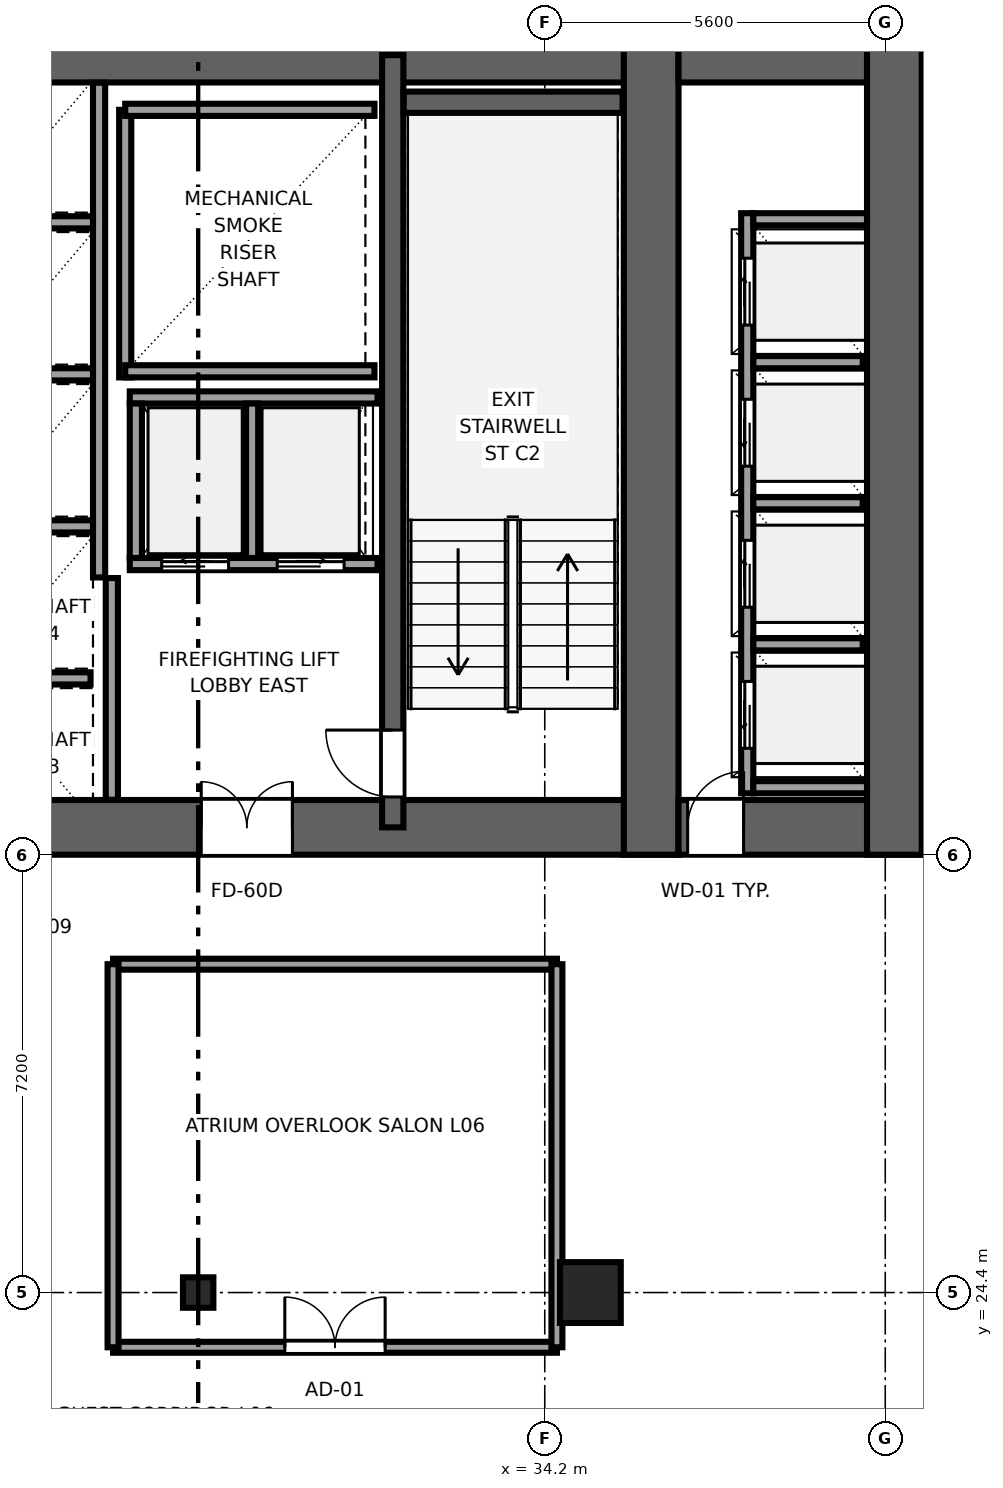
"""IFC4 building model, lengths in metres.
Left out: names, types, materials, properties, quantities, classifications, styles, units other than length and angle.
Written with IfcOpenShell. Run it as: python <this file> out.ifc"""

import sys

from ifc_helpers import new_model, si_unit, direction, frame, frame_2d, origin, origin_2d, place, context, subcontext, project, spatial, rectangle, i_section, extrude, source, transform, mapped, element, fill, save


model = new_model("IFC4")
c1 = context("Model", 3, precision=1e-05, world=origin(), true_north=direction((0.0, 1.0)))
c2 = subcontext(c1, "Body", "Model", "MODEL_VIEW")
j1 = project(units=[si_unit("LENGTHUNIT", "METRE"), si_unit("PLANEANGLEUNIT", "RADIAN")], contexts=[c1])
p1 = place(None, origin())
s1 = spatial("IfcSite", under=j1, at=p1, CompositionType="ELEMENT")
p2 = place(p1, origin())
s2 = spatial("IfcBuilding", under=s1, at=p2, CompositionType="ELEMENT")
p3 = place(p2, frame((0.0, 0.0, 32.0)))
s3 = spatial("IfcBuildingStorey", under=s2, at=p3, CompositionType="ELEMENT", Elevation=32.0)
p4 = place(p3, frame((9.6, 32.05, 0.0), z_axis=(0.0, 0.0, 1.0), x_axis=(1.0, 0.0, 0.0)))
e1 = element("IfcWall", 1, at=p4, inside=s3, PredefinedType="SHEAR", context=c2, shape_type="SweptSolid", body=[
    extrude(rectangle(XDim=26.8, YDim=0.9, at=frame_2d((13.4, 0.0))), origin(), (0.0, 0.0, 1.0), 3.55),
])
p5 = place(p4, frame((7.85, 0.0, 0.0), z_axis=(0.0, 0.0, 1.0), x_axis=(-1.0, 0.0, 0.0)))
e2 = element("IfcOpeningElement", 2, at=p5, cuts=e1, PredefinedType="OPENING", context=c2, shape_type="SweptSolid", body=[
    extrude(rectangle(XDim=1.5, YDim=2.04, at=frame_2d((0.75, 1.02))), frame((0.0, 0.46, 0.0), z_axis=(0.0, -1.0, 0.0), x_axis=(1.0, 0.0, 0.0)), (0.0, 0.0, 1.0), 0.92),
])
p6 = place(p4, frame((14.15, 0.0, 0.0), z_axis=(0.0, 0.0, 1.0), x_axis=(-1.0, 0.0, 0.0)))
e3 = element("IfcOpeningElement", 3, at=p6, cuts=e1, PredefinedType="OPENING", context=c2, shape_type="SweptSolid", body=[
    extrude(rectangle(XDim=1.5, YDim=2.04, at=frame_2d((0.75, 1.02))), frame((0.0, 0.46, 0.0), z_axis=(0.0, -1.0, 0.0), x_axis=(1.0, 0.0, 0.0)), (0.0, 0.0, 1.0), 0.92),
])
p7 = place(p4, frame((20.45, 0.0, 0.0), z_axis=(0.0, 0.0, 1.0), x_axis=(-1.0, 0.0, 0.0)))
e4 = element("IfcOpeningElement", 4, at=p7, cuts=e1, PredefinedType="OPENING", context=c2, shape_type="SweptSolid", body=[
    extrude(rectangle(XDim=1.5, YDim=2.04, at=frame_2d((0.75, 1.02))), frame((0.0, 0.46, 0.0), z_axis=(0.0, -1.0, 0.0), x_axis=(1.0, 0.0, 0.0)), (0.0, 0.0, 1.0), 0.92),
])
p8 = place(p3, frame((9.6, 44.75, 0.0), z_axis=(0.0, 0.0, 1.0), x_axis=(1.0, 0.0, 0.0)))
e5 = element("IfcWall", 5, at=p8, inside=s3, PredefinedType="SHEAR", context=c2, shape_type="SweptSolid", body=[
    extrude(rectangle(XDim=26.8, YDim=0.9, at=frame_2d((13.4, 0.0))), origin(), (0.0, 0.0, 1.0), 3.55),
])
p9 = place(p3, frame((35.95, 31.6, 0.0), z_axis=(0.0, 0.0, 1.0), x_axis=(0.0, 1.0, 0.0)))
e6 = element("IfcWall", 6, at=p9, inside=s3, PredefinedType="SHEAR", context=c2, shape_type="SweptSolid", body=[
    extrude(rectangle(XDim=13.6, YDim=0.9, at=frame_2d((6.8, 0.0))), origin(), (0.0, 0.0, 1.0), 3.55),
])
p10 = place(p3, frame((31.7, 32.05, 0.0), z_axis=(0.0, 0.0, 1.0), x_axis=(0.0, 1.0, 0.0)))
e7 = element("IfcWall", 7, at=p10, inside=s3, PredefinedType="SHEAR", context=c2, shape_type="SweptSolid", body=[
    extrude(rectangle(XDim=12.7, YDim=0.35, at=frame_2d((6.35, 0.0))), origin(), (0.0, 0.0, 1.0), 3.55),
])
p11 = place(p10, frame((1.6, 0.0, 0.0), z_axis=(0.0, 0.0, 1.0), x_axis=(-1.0, 0.0, 0.0)))
e8 = element("IfcOpeningElement", 8, at=p11, cuts=e7, PredefinedType="OPENING", context=c2, shape_type="SweptSolid", body=[
    extrude(rectangle(XDim=1.1, YDim=2.12, at=frame_2d((0.55, 1.06))), frame((0.0, 0.185, 0.0), z_axis=(0.0, -1.0, 0.0), x_axis=(1.0, 0.0, 0.0)), (0.0, 0.0, 1.0), 0.37),
])
p12 = place(p3, frame((36.4, 32.05, 0.0), z_axis=(0.0, 0.0, 1.0), x_axis=(1.0, 0.0, 0.0)))
e9 = element("IfcWall", 9, at=p12, inside=s3, PredefinedType="SHEAR", context=c2, shape_type="SweptSolid", body=[
    extrude(rectangle(XDim=4.0, YDim=0.9, at=frame_2d((2.0, 0.0))), origin(), (0.0, 0.0, 1.0), 3.55),
])
p13 = place(p12, frame((1.07, 0.0, 0.0), z_axis=(0.0, 0.0, 1.0), x_axis=(-1.0, 0.0, 0.0)))
e10 = element("IfcOpeningElement", 10, at=p13, cuts=e9, PredefinedType="OPENING", context=c2, shape_type="SweptSolid", body=[
    extrude(rectangle(XDim=0.92, YDim=2.01, at=frame_2d((0.46, 1.005))), frame((0.0, 0.46, 0.0), z_axis=(0.0, -1.0, 0.0), x_axis=(1.0, 0.0, 0.0)), (0.0, 0.0, 1.0), 0.92),
])
p14 = place(p3, frame((36.4, 44.75, 0.0), z_axis=(0.0, 0.0, 1.0), x_axis=(1.0, 0.0, 0.0)))
e11 = element("IfcWall", 11, at=p14, inside=s3, PredefinedType="SHEAR", context=c2, shape_type="SweptSolid", body=[
    extrude(rectangle(XDim=4.0, YDim=0.9, at=frame_2d((2.0, 0.0))), origin(), (0.0, 0.0, 1.0), 3.55),
])
p15 = place(p3, frame((39.95, 31.6, 0.0), z_axis=(0.0, 0.0, 1.0), x_axis=(0.0, 1.0, 0.0)))
e12 = element("IfcWall", 12, at=p15, inside=s3, PredefinedType="SHEAR", context=c2, shape_type="SweptSolid", body=[
    extrude(rectangle(XDim=13.6, YDim=0.9, at=frame_2d((6.8, 0.0))), origin(), (0.0, 0.0, 1.0), 3.55),
])
p16 = place(p3, frame((31.88, 43.975, 0.0), z_axis=(0.0, 0.0, 1.0), x_axis=(1.0, 0.0, 0.0)))
e13 = element("IfcWall", 13, at=p16, inside=s3, PredefinedType="SHEAR", context=c2, shape_type="SweptSolid", body=[
    extrude(rectangle(XDim=3.6, YDim=0.35, at=frame_2d((1.8, 0.0))), origin(), (0.0, 0.0, 1.0), 3.55),
])
m1 = source(origin(), c2, "Body", "SweptSolid", [
    extrude(rectangle(XDim=1.0, YDim=1.0, at=origin_2d()), origin(), (0.0, 0.0, 1.0), 3.55),
])
p17 = place(p3, frame((34.95, 24.4, 0.0), z_axis=(0.0, 0.0, 1.0), x_axis=(1.0, 0.0, 0.0)))
e14 = element("IfcColumn", 14, at=p17, inside=s3, PredefinedType="COLUMN", context=c2, shape_type="MappedRepresentation", body=[
    mapped(m1, transform((0.0, 0.0, 0.0), x_axis=(1.0, 0.0, 0.0), y_axis=(0.0, 1.0, 0.0), z_axis=(0.0, 0.0, 1.0), scale=1.0)),
])
m2 = source(origin(), c2, "Body", "SweptSolid", [
    extrude(i_section(OverallWidth=0.5, OverallDepth=0.5, WebThickness=0.028, FlangeThickness=0.045, at=origin_2d()), origin(), (0.0, 0.0, 1.0), 3.55),
])
p18 = place(p3, frame((28.5, 24.4, 0.0), z_axis=(0.0, 0.0, 1.0), x_axis=(1.0, 0.0, 0.0)))
e15 = element("IfcColumn", 15, at=p18, inside=s3, PredefinedType="COLUMN", context=c2, shape_type="MappedRepresentation", body=[
    mapped(m2, transform((0.0, 0.0, 0.0), x_axis=(1.0, 0.0, 0.0), y_axis=(0.0, 1.0, 0.0), z_axis=(0.0, 0.0, 1.0), scale=1.0)),
])
p19 = place(p3, frame((27.3, 39.45, 0.0), z_axis=(0.0, 0.0, 1.0), x_axis=(0.0, 1.0, 0.0)))
e16 = element("IfcWall", 16, at=p19, inside=s3, PredefinedType="SOLIDWALL", context=c2, shape_type="SweptSolid", body=[
    extrude(rectangle(XDim=4.4, YDim=0.2, at=frame_2d((2.2, 0.0))), origin(), (0.0, 0.0, 1.0), 3.37),
])
for number, where, z_axis, x_axis in (
    (17, (27.3, 39.55, 0.0), (0.0, 0.0, 1.0), (1.0, 0.0, 0.0)),
    (18, (27.3, 43.85, 0.0), (0.0, 0.0, 1.0), (1.0, 0.0, 0.0)),
):
    element("IfcWall", number, at=place(p3, frame(where, z_axis=z_axis, x_axis=x_axis)), inside=s3, PredefinedType="SOLIDWALL", context=c2, shape_type="SweptSolid", body=[
        extrude(rectangle(XDim=4.1, YDim=0.2, at=frame_2d((2.05, 0.0))), origin(), (0.0, 0.0, 1.0), 3.37),
    ])
p20 = place(p3, frame((27.08, 32.504, 0.0), z_axis=(0.0, 0.0, 1.0), x_axis=(0.0, 1.0, 0.0)))
e19 = element("IfcWall", 19, at=p20, inside=s3, PredefinedType="SOLIDWALL", context=c2, shape_type="SweptSolid", body=[
    extrude(rectangle(XDim=3.646, YDim=0.2, at=frame_2d((1.823, 0.0))), origin(), (0.0, 0.0, 1.0), 3.37),
])
p21 = place(p3, frame((27.375, 36.38, 0.0), z_axis=(0.0, 0.0, 1.0), x_axis=(1.0, 0.0, 0.0)))
e20 = element("IfcWall", 20, at=p21, inside=s3, PredefinedType="SOLIDWALL", context=c2, shape_type="SweptSolid", body=[
    extrude(rectangle(XDim=4.075, YDim=0.2, at=frame_2d((2.038, 0.0))), origin(), (0.0, 0.0, 1.0), 3.37),
])
p22 = place(p21, frame((0.525, 0.0, 0.0)))
e21 = element("IfcOpeningElement", 21, at=p22, cuts=e20, PredefinedType="OPENING", context=c2, shape_type="SweptSolid", body=[
    extrude(rectangle(XDim=1.1, YDim=2.12, at=frame_2d((0.55, 1.06))), frame((0.0, 0.11, 0.0), z_axis=(0.0, -1.0, 0.0), x_axis=(1.0, 0.0, 0.0)), (0.0, 0.0, 1.0), 0.22),
])
p23 = place(p21, frame((2.425, 0.0, 0.0)))
e22 = element("IfcOpeningElement", 22, at=p23, cuts=e20, PredefinedType="OPENING", context=c2, shape_type="SweptSolid", body=[
    extrude(rectangle(XDim=1.1, YDim=2.12, at=frame_2d((0.55, 1.06))), frame((0.0, 0.11, 0.0), z_axis=(0.0, -1.0, 0.0), x_axis=(1.0, 0.0, 0.0)), (0.0, 0.0, 1.0), 0.22),
])
p24 = place(p3, frame((27.375, 39.12, 0.0), z_axis=(0.0, 0.0, 1.0), x_axis=(1.0, 0.0, 0.0)))
e23 = element("IfcWall", 23, at=p24, inside=s3, PredefinedType="SOLIDWALL", context=c2, shape_type="SweptSolid", body=[
    extrude(rectangle(XDim=4.075, YDim=0.2, at=frame_2d((2.038, 0.0))), origin(), (0.0, 0.0, 1.0), 3.37),
])
for number, where, z_axis, x_axis in (
    (24, (27.475, 36.48, 0.0), (0.0, 0.0, 1.0), (0.0, 1.0, 0.0)),
    (25, (29.387, 36.48, 0.0), (0.0, 0.0, 1.0), (0.0, 1.0, 0.0)),
):
    element("IfcWall", number, at=place(p3, frame(where, z_axis=z_axis, x_axis=x_axis)), inside=s3, PredefinedType="SOLIDWALL", context=c2, shape_type="SweptSolid", body=[
        extrude(rectangle(XDim=2.54, YDim=0.2, at=frame_2d((1.27, 0.0))), origin(), (0.0, 0.0, 1.0), 3.37),
    ])
p25 = place(p3, frame((26.87, 36.16, 0.0), z_axis=(0.0, 0.0, 1.0), x_axis=(0.0, 1.0, 0.0)))
e26 = element("IfcWall", 26, at=p25, inside=s3, PredefinedType="SOLIDWALL", context=c2, shape_type="SweptSolid", body=[
    extrude(rectangle(XDim=8.136, YDim=0.2, at=frame_2d((4.068, 0.0))), origin(), (0.0, 0.0, 1.0), 3.37),
])
p26 = place(p3, frame((24.93, 34.5, 0.0), z_axis=(0.0, 0.0, 1.0), x_axis=(1.0, 0.0, 0.0)))
e27 = element("IfcWall", 27, at=p26, inside=s3, PredefinedType="SOLIDWALL", context=c2, shape_type="SweptSolid", body=[
    extrude(rectangle(XDim=1.8, YDim=0.2, at=frame_2d((0.9, 0.0))), origin(), (0.0, 0.0, 1.0), 3.37),
])
for number, where, z_axis, x_axis in (
    (28, (24.93, 37.0, 0.0), (0.0, 0.0, 1.0), (1.0, 0.0, 0.0)),
    (29, (24.93, 39.5, 0.0), (0.0, 0.0, 1.0), (1.0, 0.0, 0.0)),
    (30, (24.93, 42.0, 0.0), (0.0, 0.0, 1.0), (1.0, 0.0, 0.0)),
):
    element("IfcWall", number, at=place(p3, frame(where, z_axis=z_axis, x_axis=x_axis)), inside=s3, PredefinedType="SOLIDWALL", context=c2, shape_type="SweptSolid", body=[
        extrude(rectangle(XDim=1.84, YDim=0.2, at=frame_2d((0.92, 0.0))), origin(), (0.0, 0.0, 1.0), 3.37),
    ])
p27 = place(p3, frame((37.53, 32.61, 0.0), z_axis=(0.0, 0.0, 1.0), x_axis=(0.0, 1.0, 0.0)))
e31 = element("IfcWall", 31, at=p27, inside=s3, PredefinedType="SOLIDWALL", context=c2, shape_type="SweptSolid", body=[
    extrude(rectangle(XDim=9.54, YDim=0.2, at=frame_2d((4.77, 0.0))), origin(), (0.0, 0.0, 1.0), 3.37),
])
p28 = place(p27, frame((0.74, 0.0, 0.0)))
e32 = element("IfcOpeningElement", 32, at=p28, cuts=e31, PredefinedType="OPENING", context=c2, shape_type="SweptSolid", body=[
    extrude(rectangle(XDim=1.1, YDim=2.12, at=frame_2d((0.55, 1.06))), frame((0.0, 0.11, 0.0), z_axis=(0.0, -1.0, 0.0), x_axis=(1.0, 0.0, 0.0)), (0.0, 0.0, 1.0), 0.22),
])
p29 = place(p27, frame((3.06, 0.0, 0.0)))
e33 = element("IfcOpeningElement", 33, at=p29, cuts=e31, PredefinedType="OPENING", context=c2, shape_type="SweptSolid", body=[
    extrude(rectangle(XDim=1.1, YDim=2.12, at=frame_2d((0.55, 1.06))), frame((0.0, 0.11, 0.0), z_axis=(0.0, -1.0, 0.0), x_axis=(1.0, 0.0, 0.0)), (0.0, 0.0, 1.0), 0.22),
])
p30 = place(p27, frame((5.38, 0.0, 0.0)))
e34 = element("IfcOpeningElement", 34, at=p30, cuts=e31, PredefinedType="OPENING", context=c2, shape_type="SweptSolid", body=[
    extrude(rectangle(XDim=1.1, YDim=2.12, at=frame_2d((0.55, 1.06))), frame((0.0, 0.11, 0.0), z_axis=(0.0, -1.0, 0.0), x_axis=(1.0, 0.0, 0.0)), (0.0, 0.0, 1.0), 0.22),
])
p31 = place(p27, frame((7.7, 0.0, 0.0)))
e35 = element("IfcOpeningElement", 35, at=p31, cuts=e31, PredefinedType="OPENING", context=c2, shape_type="SweptSolid", body=[
    extrude(rectangle(XDim=1.1, YDim=2.12, at=frame_2d((0.55, 1.06))), frame((0.0, 0.11, 0.0), z_axis=(0.0, -1.0, 0.0), x_axis=(1.0, 0.0, 0.0)), (0.0, 0.0, 1.0), 0.22),
])
for number, where, z_axis, x_axis in (
    (36, (37.63, 32.71, 0.0), (0.0, 0.0, 1.0), (1.0, 0.0, 0.0)),
    (37, (37.63, 42.05, 0.0), (0.0, 0.0, 1.0), (1.0, 0.0, 0.0)),
):
    element("IfcWall", number, at=place(p3, frame(where, z_axis=z_axis, x_axis=x_axis)), inside=s3, PredefinedType="SOLIDWALL", context=c2, shape_type="SweptSolid", body=[
        extrude(rectangle(XDim=1.87, YDim=0.2, at=frame_2d((0.935, 0.0))), origin(), (0.0, 0.0, 1.0), 3.37),
    ])
for number, where, z_axis, x_axis in (
    (38, (37.63, 35.06, 0.0), (0.0, 0.0, 1.0), (1.0, 0.0, 0.0)),
    (39, (37.63, 37.38, 0.0), (0.0, 0.0, 1.0), (1.0, 0.0, 0.0)),
    (40, (37.63, 39.7, 0.0), (0.0, 0.0, 1.0), (1.0, 0.0, 0.0)),
):
    element("IfcWall", number, at=place(p3, frame(where, z_axis=z_axis, x_axis=x_axis)), inside=s3, PredefinedType="SOLIDWALL", context=c2, shape_type="SweptSolid", body=[
        extrude(rectangle(XDim=1.8, YDim=0.2, at=frame_2d((0.9, 0.0))), origin(), (0.0, 0.0, 1.0), 3.37),
    ])
p32 = place(p3, frame((27.1, 23.5, 0.0), z_axis=(0.0, 0.0, 1.0), x_axis=(1.0, 0.0, 0.0)))
e41 = element("IfcWall", 41, at=p32, inside=s3, PredefinedType="PARTITIONING", context=c2, shape_type="SweptSolid", body=[
    extrude(rectangle(XDim=7.3, YDim=0.18, at=frame_2d((3.65, 0.0))), origin(), (0.0, 0.0, 1.0), 3.37),
])
p33 = place(p32, frame((2.825, 0.0, 0.0)))
e42 = element("IfcOpeningElement", 42, at=p33, cuts=e41, PredefinedType="OPENING", context=c2, shape_type="SweptSolid", body=[
    extrude(rectangle(XDim=1.65, YDim=2.15, at=frame_2d((0.825, 1.075))), frame((0.0, 0.1, 0.0), z_axis=(0.0, -1.0, 0.0), x_axis=(1.0, 0.0, 0.0)), (0.0, 0.0, 1.0), 0.2),
])
p34 = place(p3, frame((27.1, 29.8, 0.0), z_axis=(0.0, 0.0, 1.0), x_axis=(1.0, 0.0, 0.0)))
e43 = element("IfcWall", 43, at=p34, inside=s3, PredefinedType="PARTITIONING", context=c2, shape_type="SweptSolid", body=[
    extrude(rectangle(XDim=7.3, YDim=0.18, at=frame_2d((3.65, 0.0))), origin(), (0.0, 0.0, 1.0), 3.37),
])
for number, where, z_axis, x_axis in (
    (44, (27.1, 23.5, 0.0), (0.0, 0.0, 1.0), (0.0, 1.0, 0.0)),
    (45, (34.4, 23.5, 0.0), (0.0, 0.0, 1.0), (0.0, 1.0, 0.0)),
):
    element("IfcWall", number, at=place(p3, frame(where, z_axis=z_axis, x_axis=x_axis)), inside=s3, PredefinedType="PARTITIONING", context=c2, shape_type="SweptSolid", body=[
        extrude(rectangle(XDim=6.3, YDim=0.18, at=frame_2d((3.15, 0.0))), origin(), (0.0, 0.0, 1.0), 3.37),
    ])
m3 = source(origin(), c2, "Body", "SweptSolid", [
    extrude(rectangle(XDim=1.1, YDim=2.12, at=frame_2d((0.55, 1.06))), frame((0.0, 0.025, 0.0), z_axis=(0.0, -1.0, 0.0), x_axis=(1.0, 0.0, 0.0)), (0.0, 0.0, 1.0), 0.05),
])
p35 = place(p11, origin())
e46 = element("IfcDoor", 46, at=p35, inside=s3, OperationType="SINGLE_SWING_RIGHT", PredefinedType="DOOR", context=c2, shape_type="MappedRepresentation", body=[
    mapped(m3, transform((0.0, 0.0, 0.0), x_axis=(1.0, 0.0, 0.0), y_axis=(0.0, 1.0, 0.0), z_axis=(0.0, 0.0, 1.0), scale=1.0)),
])
fill(e8, e46)
m4 = source(origin(), c2, "Body", "SweptSolid", [
    extrude(rectangle(XDim=1.5, YDim=2.04, at=frame_2d((0.75, 1.02))), frame((0.0, 0.025, 0.0), z_axis=(0.0, -1.0, 0.0), x_axis=(1.0, 0.0, 0.0)), (0.0, 0.0, 1.0), 0.05),
])
p36 = place(p7, origin())
e47 = element("IfcDoor", 47, at=p36, inside=s3, OperationType="DOUBLE_DOOR_SINGLE_SWING", PredefinedType="DOOR", context=c2, shape_type="MappedRepresentation", body=[
    mapped(m4, transform((0.0, 0.0, 0.0), x_axis=(1.0, 0.0, 0.0), y_axis=(0.0, 1.0, 0.0), z_axis=(0.0, 0.0, 1.0), scale=1.0)),
])
fill(e4, e47)
m5 = source(origin(), c2, "Body", "SweptSolid", [
    extrude(rectangle(XDim=0.92, YDim=2.01, at=frame_2d((0.46, 1.005))), frame((0.0, 0.025, 0.0), z_axis=(0.0, -1.0, 0.0), x_axis=(1.0, 0.0, 0.0)), (0.0, 0.0, 1.0), 0.05),
])
p37 = place(p13, origin())
e48 = element("IfcDoor", 48, at=p37, inside=s3, OperationType="SINGLE_SWING_RIGHT", PredefinedType="DOOR", context=c2, shape_type="MappedRepresentation", body=[
    mapped(m5, transform((0.0, 0.0, 0.0), x_axis=(1.0, 0.0, 0.0), y_axis=(0.0, 1.0, 0.0), z_axis=(0.0, 0.0, 1.0), scale=1.0)),
])
fill(e10, e48)
m6 = source(origin(), c2, "Body", "SweptSolid", [
    extrude(rectangle(XDim=1.1, YDim=2.12, at=frame_2d((0.55, 1.06))), frame((0.0, 0.025, 0.0), z_axis=(0.0, -1.0, 0.0), x_axis=(1.0, 0.0, 0.0)), (0.0, 0.0, 1.0), 0.05),
])
p38 = place(p22, origin())
e49 = element("IfcDoor", 49, at=p38, inside=s3, OperationType="SLIDING_TO_LEFT", PredefinedType="DOOR", context=c2, shape_type="MappedRepresentation", body=[
    mapped(m6, transform((0.0, 0.0, 0.0), x_axis=(1.0, 0.0, 0.0), y_axis=(0.0, 1.0, 0.0), z_axis=(0.0, 0.0, 1.0), scale=1.0)),
])
fill(e21, e49)
p39 = place(p23, origin())
e50 = element("IfcDoor", 50, at=p39, inside=s3, OperationType="SLIDING_TO_RIGHT", PredefinedType="DOOR", context=c2, shape_type="MappedRepresentation", body=[
    mapped(m6, transform((0.0, 0.0, 0.0), x_axis=(1.0, 0.0, 0.0), y_axis=(0.0, 1.0, 0.0), z_axis=(0.0, 0.0, 1.0), scale=1.0)),
])
fill(e22, e50)
p40 = place(p28, origin())
e51 = element("IfcDoor", 51, at=p40, inside=s3, OperationType="SLIDING_TO_LEFT", PredefinedType="DOOR", context=c2, shape_type="MappedRepresentation", body=[
    mapped(m6, transform((0.0, 0.0, 0.0), x_axis=(1.0, 0.0, 0.0), y_axis=(0.0, 1.0, 0.0), z_axis=(0.0, 0.0, 1.0), scale=1.0)),
])
fill(e32, e51)
p41 = place(p29, origin())
e52 = element("IfcDoor", 52, at=p41, inside=s3, OperationType="SLIDING_TO_RIGHT", PredefinedType="DOOR", context=c2, shape_type="MappedRepresentation", body=[
    mapped(m6, transform((0.0, 0.0, 0.0), x_axis=(1.0, 0.0, 0.0), y_axis=(0.0, 1.0, 0.0), z_axis=(0.0, 0.0, 1.0), scale=1.0)),
])
fill(e33, e52)
p42 = place(p30, origin())
e53 = element("IfcDoor", 53, at=p42, inside=s3, OperationType="SLIDING_TO_LEFT", PredefinedType="DOOR", context=c2, shape_type="MappedRepresentation", body=[
    mapped(m6, transform((0.0, 0.0, 0.0), x_axis=(1.0, 0.0, 0.0), y_axis=(0.0, 1.0, 0.0), z_axis=(0.0, 0.0, 1.0), scale=1.0)),
])
fill(e34, e53)
p43 = place(p31, origin())
e54 = element("IfcDoor", 54, at=p43, inside=s3, OperationType="SLIDING_TO_RIGHT", PredefinedType="DOOR", context=c2, shape_type="MappedRepresentation", body=[
    mapped(m6, transform((0.0, 0.0, 0.0), x_axis=(1.0, 0.0, 0.0), y_axis=(0.0, 1.0, 0.0), z_axis=(0.0, 0.0, 1.0), scale=1.0)),
])
fill(e35, e54)
m7 = source(origin(), c2, "Body", "SweptSolid", [
    extrude(rectangle(XDim=1.65, YDim=2.15, at=frame_2d((0.825, 1.075))), frame((0.0, 0.025, 0.0), z_axis=(0.0, -1.0, 0.0), x_axis=(1.0, 0.0, 0.0)), (0.0, 0.0, 1.0), 0.05),
])
p44 = place(p33, origin())
e55 = element("IfcDoor", 55, at=p44, inside=s3, OperationType="DOUBLE_DOOR_SINGLE_SWING", PredefinedType="DOOR", context=c2, shape_type="MappedRepresentation", body=[
    mapped(m7, transform((0.0, 0.0, 0.0), x_axis=(1.0, 0.0, 0.0), y_axis=(0.0, 1.0, 0.0), z_axis=(0.0, 0.0, 1.0), scale=1.0)),
])
fill(e42, e55)
save(model, sys.argv[1])
